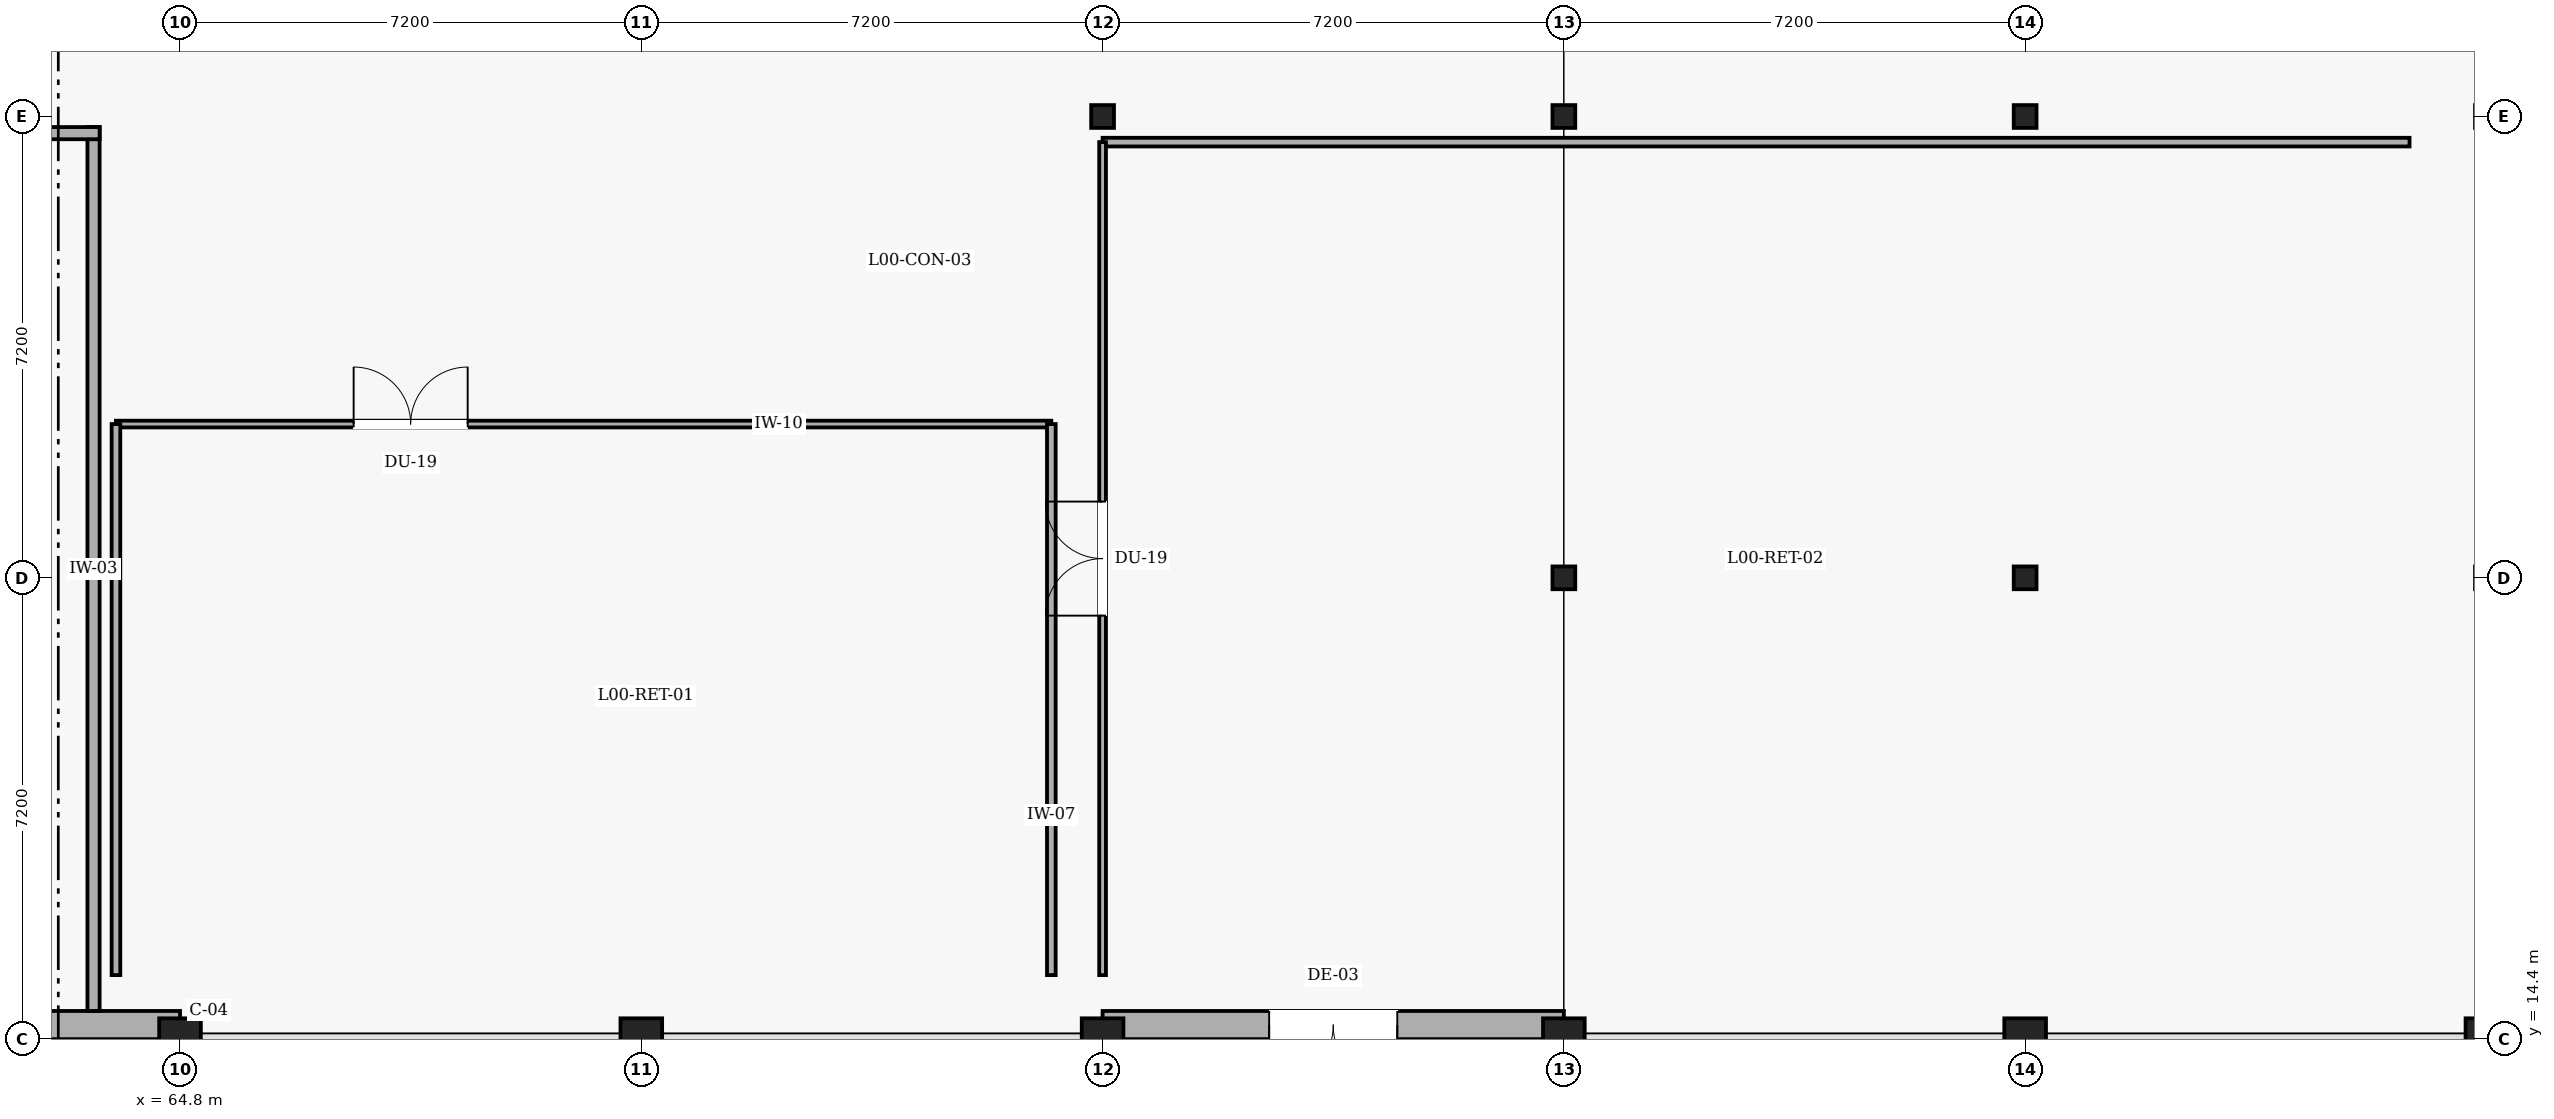
"""IFC4 building model, lengths in metres.
Left out: names, types, materials, properties, quantities, classifications, styles, units other than length and angle.
Written with IfcOpenShell. Run it as: python <this file> out.ifc"""

import sys

from ifc_helpers import new_model, si_unit, direction, frame, frame_2d, origin, origin_2d, place, context, subcontext, project, spatial, rectangle, hollow_circle, extrude, element, fill, save


model = new_model("IFC4")
c1 = context("Model", 3, precision=1e-05, world=origin(), true_north=direction((0.0, 1.0)))
c2 = subcontext(c1, "Body", "Model", "MODEL_VIEW")
j1 = project(units=[si_unit("LENGTHUNIT", "METRE"), si_unit("PLANEANGLEUNIT", "RADIAN")], contexts=[c1])
p1 = place(None, origin())
s1 = spatial("IfcSite", under=j1, at=p1, CompositionType="ELEMENT")
p2 = place(p1, origin())
s2 = spatial("IfcBuilding", under=s1, at=p2, CompositionType="ELEMENT")
p3 = place(p2, origin())
s3 = spatial("IfcBuildingStorey", under=s2, at=p3, CompositionType="ELEMENT", Elevation=0.0)
for number, where, z_axis, x_axis in (
    (1, (64.8, 14.4, 0.0), (0.0, 0.0, 1.0), (1.0, 0.0, 0.0)),
    (2, (72.0, 14.4, 0.0), (0.0, 0.0, 1.0), (1.0, 0.0, 0.0)),
    (3, (79.2, 14.4, 0.0), (0.0, 0.0, 1.0), (1.0, 0.0, 0.0)),
):
    element("IfcColumn", number, at=place(p3, frame(where, z_axis=z_axis, x_axis=x_axis)), inside=s3, PredefinedType="COLUMN", context=c2, shape_type="SweptSolid", body=[
        extrude(rectangle(XDim=0.65, YDim=0.65, at=origin_2d()), origin(), (0.0, 0.0, 1.0), 5.4),
    ])
p4 = place(p3, frame((79.2, 28.8, 0.0), z_axis=(0.0, 0.0, 1.0), x_axis=(1.0, 0.0, 0.0)))
e4 = element("IfcColumn", 4, at=p4, inside=s3, PredefinedType="COLUMN", context=c2, shape_type="SweptSolid", body=[
    extrude(hollow_circle(Radius=0.178, WallThickness=0.016, at=origin_2d()), origin(), (0.0, 0.0, 1.0), 5.1),
])
p5 = place(p3, frame((86.4, 14.4, 0.0), z_axis=(0.0, 0.0, 1.0), x_axis=(1.0, 0.0, 0.0)))
e5 = element("IfcColumn", 5, at=p5, inside=s3, PredefinedType="COLUMN", context=c2, shape_type="SweptSolid", body=[
    extrude(rectangle(XDim=0.65, YDim=0.65, at=origin_2d()), origin(), (0.0, 0.0, 1.0), 5.4),
])
for number, where, z_axis, x_axis in (
    (6, (86.4, 21.6, 0.0), (0.0, 0.0, 1.0), (1.0, 0.0, 0.0)),
    (7, (86.4, 28.8, 0.0), (0.0, 0.0, 1.0), (1.0, 0.0, 0.0)),
):
    element("IfcColumn", number, at=place(p3, frame(where, z_axis=z_axis, x_axis=x_axis)), inside=s3, PredefinedType="COLUMN", context=c2, shape_type="SweptSolid", body=[
        extrude(hollow_circle(Radius=0.178, WallThickness=0.016, at=origin_2d()), origin(), (0.0, 0.0, 1.0), 5.1),
    ])
p6 = place(p3, frame((93.6, 14.4, 0.0), z_axis=(0.0, 0.0, 1.0), x_axis=(1.0, 0.0, 0.0)))
e8 = element("IfcColumn", 8, at=p6, inside=s3, PredefinedType="COLUMN", context=c2, shape_type="SweptSolid", body=[
    extrude(rectangle(XDim=0.65, YDim=0.65, at=origin_2d()), origin(), (0.0, 0.0, 1.0), 5.4),
])
for number, where, z_axis, x_axis in (
    (9, (93.6, 21.6, 0.0), (0.0, 0.0, 1.0), (1.0, 0.0, 0.0)),
    (10, (93.6, 28.8, 0.0), (0.0, 0.0, 1.0), (1.0, 0.0, 0.0)),
):
    element("IfcColumn", number, at=place(p3, frame(where, z_axis=z_axis, x_axis=x_axis)), inside=s3, PredefinedType="COLUMN", context=c2, shape_type="SweptSolid", body=[
        extrude(hollow_circle(Radius=0.178, WallThickness=0.016, at=origin_2d()), origin(), (0.0, 0.0, 1.0), 5.1),
    ])
p7 = place(p3, frame((100.8, 14.4, 0.0), z_axis=(0.0, 0.0, 1.0), x_axis=(1.0, 0.0, 0.0)))
e11 = element("IfcColumn", 11, at=p7, inside=s3, PredefinedType="COLUMN", context=c2, shape_type="SweptSolid", body=[
    extrude(rectangle(XDim=0.65, YDim=0.65, at=origin_2d()), origin(), (0.0, 0.0, 1.0), 5.4),
])
p8 = place(p3, frame((86.4, 14.62, 0.0), z_axis=(0.0, 0.0, 1.0), x_axis=(-1.0, 0.0, 0.0)))
e12 = element("IfcWall", 12, at=p8, inside=s3, PredefinedType="SOLIDWALL", context=c2, shape_type="SweptSolid", body=[
    extrude(rectangle(XDim=7.2, YDim=0.44, at=frame_2d((3.6, 0.0))), origin(), (0.0, 0.0, 1.0), 5.1),
])
p9 = place(p8, frame((2.6, 0.0, 0.0)))
e13 = element("IfcOpeningElement", 13, at=p9, cuts=e12, PredefinedType="OPENING", context=c2, shape_type="SweptSolid", body=[
    extrude(rectangle(XDim=2.0, YDim=2.3, at=frame_2d((1.0, 1.15))), frame((0.0, 0.23, 0.0), z_axis=(0.0, -1.0, 0.0), x_axis=(1.0, 0.0, 0.0)), (0.0, 0.0, 1.0), 0.46),
])
p10 = place(p3, frame((64.8, 14.62, 0.0), z_axis=(0.0, 0.0, 1.0), x_axis=(-1.0, 0.0, 0.0)))
e14 = element("IfcWall", 14, at=p10, inside=s3, PredefinedType="SOLIDWALL", context=c2, shape_type="SweptSolid", body=[
    extrude(rectangle(XDim=7.2, YDim=0.44, at=frame_2d((3.6, 0.0))), origin(), (0.0, 0.0, 1.0), 5.1),
])
p11 = place(p10, frame((2.4, 0.0, 0.0)))
e15 = element("IfcOpeningElement", 15, at=p11, cuts=e14, PredefinedType="OPENING", context=c2, shape_type="SweptSolid", body=[
    extrude(rectangle(XDim=2.4, YDim=2.5, at=frame_2d((1.2, 1.25))), frame((0.0, 0.23, 0.0), z_axis=(0.0, -1.0, 0.0), x_axis=(1.0, 0.0, 0.0)), (0.0, 0.0, 1.0), 0.46),
])
p12 = place(p3, frame((63.8, 24.0, 0.0), z_axis=(0.0, 0.0, 1.0), x_axis=(1.0, 0.0, 0.0)))
e16 = element("IfcWall", 16, at=p12, inside=s3, PredefinedType="PARTITIONING", context=c2, shape_type="SweptSolid", body=[
    extrude(rectangle(XDim=14.6, YDim=0.105, at=frame_2d((7.3, 0.0))), origin(), (0.0, 0.0, 1.0), 5.05),
])
p13 = place(p12, frame((3.71, 0.0, 0.0)))
e17 = element("IfcOpeningElement", 17, at=p13, cuts=e16, PredefinedType="OPENING", context=c2, shape_type="SweptSolid", body=[
    extrude(rectangle(XDim=1.78, YDim=2.28, at=frame_2d((0.89, 1.14))), frame((0.0, 0.062, 0.0), z_axis=(0.0, -1.0, 0.0), x_axis=(1.0, 0.0, 0.0)), (0.0, 0.0, 1.0), 0.125),
])
for number, where, z_axis, x_axis in (
    (18, (78.4, 24.0, 0.0), (0.0, 0.0, 1.0), (0.0, -1.0, 0.0)),
    (19, (63.8, 15.4, 0.0), (0.0, 0.0, 1.0), (0.0, 1.0, 0.0)),
):
    element("IfcWall", number, at=place(p3, frame(where, z_axis=z_axis, x_axis=x_axis)), inside=s3, PredefinedType="PARTITIONING", context=c2, shape_type="SweptSolid", body=[
        extrude(rectangle(XDim=8.6, YDim=0.135, at=frame_2d((4.3, 0.0))), origin(), (0.0, 0.0, 1.0), 5.05),
    ])
p14 = place(p3, frame((79.2, 28.4, 0.0), z_axis=(0.0, 0.0, 1.0), x_axis=(1.0, 0.0, 0.0)))
e20 = element("IfcWall", 20, at=p14, inside=s3, PredefinedType="PARTITIONING", context=c2, shape_type="SweptSolid", body=[
    extrude(rectangle(XDim=20.4, YDim=0.135, at=frame_2d((10.2, 0.0))), origin(), (0.0, 0.0, 1.0), 4.7),
])
p15 = place(p3, frame((79.2, 15.4, 0.0), z_axis=(0.0, 0.0, 1.0), x_axis=(0.0, 1.0, 0.0)))
e21 = element("IfcWall", 21, at=p15, inside=s3, PredefinedType="PARTITIONING", context=c2, shape_type="SweptSolid", body=[
    extrude(rectangle(XDim=13.0, YDim=0.105, at=frame_2d((6.5, 0.0))), origin(), (0.0, 0.0, 1.0), 5.05),
])
p16 = place(p15, frame((5.61, 0.0, 0.0)))
e22 = element("IfcOpeningElement", 22, at=p16, cuts=e21, PredefinedType="OPENING", context=c2, shape_type="SweptSolid", body=[
    extrude(rectangle(XDim=1.78, YDim=2.28, at=frame_2d((0.89, 1.14))), frame((0.0, 0.062, 0.0), z_axis=(0.0, -1.0, 0.0), x_axis=(1.0, 0.0, 0.0)), (0.0, 0.0, 1.0), 0.125),
])
p17 = place(p3, frame((63.45, 14.84, 0.0), z_axis=(0.0, 0.0, 1.0), x_axis=(0.0, 1.0, 0.0)))
e23 = element("IfcWall", 23, at=p17, inside=s3, PredefinedType="PARTITIONING", context=c2, shape_type="SweptSolid", body=[
    extrude(rectangle(XDim=13.795, YDim=0.19, at=frame_2d((6.897, 0.0))), origin(), (0.0, 0.0, 1.0), 5.05),
])
p18 = place(p3, frame((57.6, 28.54, 0.0), z_axis=(0.0, 0.0, 1.0), x_axis=(1.0, 0.0, 0.0)))
e24 = element("IfcWall", 24, at=p18, inside=s3, PredefinedType="PARTITIONING", context=c2, shape_type="SweptSolid", body=[
    extrude(rectangle(XDim=5.945, YDim=0.19, at=frame_2d((2.972, 0.0))), origin(), (0.0, 0.0, 1.0), 5.05),
])
p19 = place(p9, origin())
e25 = element("IfcDoor", 25, at=p19, inside=s3, OperationType="DOUBLE_DOOR_SINGLE_SWING", PredefinedType="DOOR", context=c2, shape_type="SweptSolid", body=[
    extrude(rectangle(XDim=2.0, YDim=2.3, at=frame_2d((1.0, 1.15))), frame((0.0, 0.025, 0.0), z_axis=(0.0, -1.0, 0.0), x_axis=(1.0, 0.0, 0.0)), (0.0, 0.0, 1.0), 0.05),
])
fill(e13, e25)
p20 = place(p13, origin())
e26 = element("IfcDoor", 26, at=p20, inside=s3, OperationType="DOUBLE_DOOR_SINGLE_SWING", PredefinedType="DOOR", context=c2, shape_type="SweptSolid", body=[
    extrude(rectangle(XDim=1.78, YDim=2.28, at=frame_2d((0.89, 1.14))), frame((0.0, 0.025, 0.0), z_axis=(0.0, -1.0, 0.0), x_axis=(1.0, 0.0, 0.0)), (0.0, 0.0, 1.0), 0.05),
])
fill(e17, e26)
p21 = place(p16, origin())
e27 = element("IfcDoor", 27, at=p21, inside=s3, OperationType="DOUBLE_DOOR_SINGLE_SWING", PredefinedType="DOOR", context=c2, shape_type="SweptSolid", body=[
    extrude(rectangle(XDim=1.78, YDim=2.28, at=frame_2d((0.89, 1.14))), frame((0.0, 0.025, 0.0), z_axis=(0.0, -1.0, 0.0), x_axis=(1.0, 0.0, 0.0)), (0.0, 0.0, 1.0), 0.05),
])
fill(e22, e27)
save(model, sys.argv[1])
